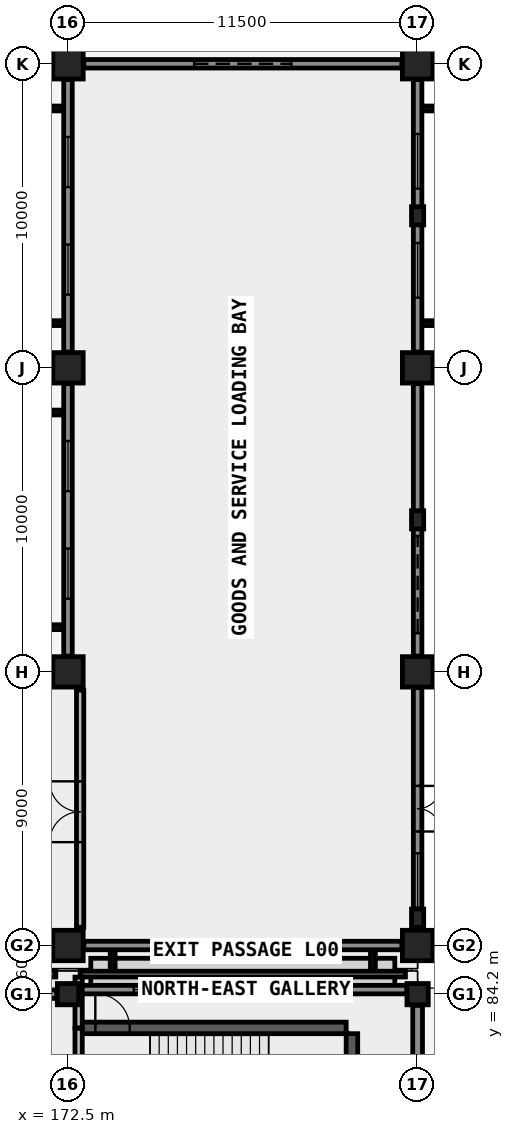
"""IFC4 building model, lengths in metres.
Left out: names, types, materials, properties, quantities, classifications, styles, units other than length and angle.
Written with IfcOpenShell. Run it as: python <this file> out.ifc"""

import sys

from ifc_helpers import new_model, si_unit, direction, frame, frame_2d, origin, origin_2d, place, context, subcontext, project, spatial, rectangle, extrude, element, fill, save


model = new_model("IFC4")
c1 = context("Model", 3, precision=1e-05, world=origin(), true_north=direction((0.0, 1.0)))
c2 = subcontext(c1, "Body", "Model", "MODEL_VIEW")
j1 = project(units=[si_unit("LENGTHUNIT", "METRE"), si_unit("PLANEANGLEUNIT", "RADIAN")], contexts=[c1])
p1 = place(None, origin())
s1 = spatial("IfcSite", under=j1, at=p1, CompositionType="ELEMENT")
p2 = place(p1, origin())
s2 = spatial("IfcBuilding", under=s1, at=p2, CompositionType="ELEMENT")
p3 = place(p2, origin())
s3 = spatial("IfcBuildingStorey", under=s2, at=p3, CompositionType="ELEMENT", Elevation=0.0)
p4 = place(p3, frame((172.5, 84.2, 0.0), z_axis=(0.0, 0.0, 1.0), x_axis=(1.0, 0.0, 0.0)))
e1 = element("IfcColumn", 1, at=p4, inside=s3, PredefinedType="COLUMN", context=c2, shape_type="SweptSolid", body=[
    extrude(rectangle(XDim=0.7, YDim=0.7, at=origin_2d()), origin(), (0.0, 0.0, 1.0), 4.2),
])
for number, where, z_axis, x_axis in (
    (2, (172.5, 85.8, 0.0), (0.0, 0.0, 1.0), (1.0, 0.0, 0.0)),
    (3, (172.5, 94.8, 0.0), (0.0, 0.0, 1.0), (1.0, 0.0, 0.0)),
    (4, (172.5, 104.8, 0.0), (0.0, 0.0, 1.0), (1.0, 0.0, 0.0)),
    (5, (172.5, 114.8, 0.0), (0.0, 0.0, 1.0), (1.0, 0.0, 0.0)),
):
    element("IfcColumn", number, at=place(p3, frame(where, z_axis=z_axis, x_axis=x_axis)), inside=s3, PredefinedType="COLUMN", context=c2, shape_type="SweptSolid", body=[
        extrude(rectangle(XDim=1.0, YDim=1.0, at=origin_2d()), origin(), (0.0, 0.0, 1.0), 4.2),
    ])
p5 = place(p3, frame((184.0, 84.2, 0.0), z_axis=(0.0, 0.0, 1.0), x_axis=(1.0, 0.0, 0.0)))
e6 = element("IfcColumn", 6, at=p5, inside=s3, PredefinedType="COLUMN", context=c2, shape_type="SweptSolid", body=[
    extrude(rectangle(XDim=0.7, YDim=0.7, at=origin_2d()), origin(), (0.0, 0.0, 1.0), 4.2),
])
for number, where, z_axis, x_axis in (
    (7, (184.0, 85.8, 0.0), (0.0, 0.0, 1.0), (1.0, 0.0, 0.0)),
    (8, (184.0, 94.8, 0.0), (0.0, 0.0, 1.0), (1.0, 0.0, 0.0)),
    (9, (184.0, 104.8, 0.0), (0.0, 0.0, 1.0), (1.0, 0.0, 0.0)),
    (10, (184.0, 114.8, 0.0), (0.0, 0.0, 1.0), (1.0, 0.0, 0.0)),
):
    element("IfcColumn", number, at=place(p3, frame(where, z_axis=z_axis, x_axis=x_axis)), inside=s3, PredefinedType="COLUMN", context=c2, shape_type="SweptSolid", body=[
        extrude(rectangle(XDim=1.0, YDim=1.0, at=origin_2d()), origin(), (0.0, 0.0, 1.0), 4.2),
    ])
for number, where, z_axis, x_axis in (
    (11, (184.0, 86.7, 0.0), (0.0, 0.0, 1.0), (1.0, 0.0, 0.0)),
    (12, (184.0, 99.8, 0.0), (0.0, 0.0, 1.0), (1.0, 0.0, 0.0)),
    (13, (184.0, 109.8, 0.0), (0.0, 0.0, 1.0), (1.0, 0.0, 0.0)),
):
    element("IfcColumn", number, at=place(p3, frame(where, z_axis=z_axis, x_axis=x_axis)), inside=s3, PredefinedType="PILASTER", context=c2, shape_type="SweptSolid", body=[
        extrude(rectangle(XDim=0.4, YDim=0.6, at=origin_2d()), origin(), (0.0, 0.0, 1.0), 4.2),
    ])
p6 = place(p3, frame((172.85, 83.09, 0.0), z_axis=(0.0, 0.0, 1.0), x_axis=(1.0, 0.0, 0.0)))
e14 = element("IfcWall", 14, at=p6, inside=s3, PredefinedType="SHEAR", context=c2, shape_type="SweptSolid", body=[
    extrude(rectangle(XDim=8.8, YDim=0.38, at=frame_2d((4.4, 0.0))), origin(), (0.0, 0.0, 1.0), 4.2),
])
p7 = place(p6, frame((0.55, 0.0, 0.0)))
e15 = element("IfcOpeningElement", 15, at=p7, cuts=e14, PredefinedType="OPENING", context=c2, shape_type="SweptSolid", body=[
    extrude(rectangle(XDim=1.13, YDim=2.15, at=frame_2d((0.565, 1.075))), frame((0.0, 0.2, 0.0), z_axis=(0.0, -1.0, 0.0), x_axis=(1.0, 0.0, 0.0)), (0.0, 0.0, 1.0), 0.4),
])
p8 = place(p3, frame((181.84, 79.1, 0.0), z_axis=(0.0, 0.0, 1.0), x_axis=(0.0, 1.0, 0.0)))
e16 = element("IfcWall", 16, at=p8, inside=s3, PredefinedType="SHEAR", context=c2, shape_type="SweptSolid", body=[
    extrude(rectangle(XDim=3.8, YDim=0.38, at=frame_2d((1.9, 0.0))), origin(), (0.0, 0.0, 1.0), 4.2),
])
p9 = place(p3, frame((184.0, 78.395, 0.0), z_axis=(0.0, 0.0, 1.0), x_axis=(0.0, 1.0, 0.0)))
e17 = element("IfcWall", 17, at=p9, inside=s3, PredefinedType="SOLIDWALL", context=c2, shape_type="SweptSolid", body=[
    extrude(rectangle(XDim=5.435, YDim=0.32, at=frame_2d((2.718, 0.0))), origin(), (0.0, 0.0, 1.0), 3.2),
])
p10 = place(p9, frame((1.768, 0.0, 0.0)))
e18 = element("IfcOpeningElement", 18, at=p10, cuts=e17, PredefinedType="OPENING", context=c2, shape_type="SweptSolid", body=[
    extrude(rectangle(XDim=1.9, YDim=2.2, at=frame_2d((0.95, 1.1))), frame((0.0, 0.17, 0.0), z_axis=(0.0, -1.0, 0.0), x_axis=(1.0, 0.0, 0.0)), (0.0, 0.0, 1.0), 0.34),
])
for number, where, z_axis, x_axis in (
    (19, (161.4, 84.86, 0.0), (0.0, 0.0, 1.0), (1.0, 0.0, 0.0)),
    (20, (172.9, 84.86, 0.0), (0.0, 0.0, 1.0), (1.0, 0.0, 0.0)),
):
    element("IfcWall", number, at=place(p3, frame(where, z_axis=z_axis, x_axis=x_axis)), inside=s3, PredefinedType="PARAPET", context=c2, shape_type="SweptSolid", body=[
        extrude(rectangle(XDim=10.7, YDim=0.19, at=frame_2d((5.35, 0.0))), origin(), (0.0, 0.0, 1.0), 1.15),
    ])
p11 = place(p3, frame((161.37, 84.2, 0.0), z_axis=(0.0, 0.0, 1.0), x_axis=(1.0, 0.0, 0.0)))
e21 = element("IfcWall", 21, at=p11, inside=s3, PredefinedType="SOLIDWALL", context=c2, shape_type="SweptSolid", body=[
    extrude(rectangle(XDim=10.76, YDim=0.28, at=frame_2d((5.38, 0.0))), origin(), (0.0, 0.0, 1.0), 3.0),
])
p12 = place(p11, frame((2.173, 0.0, 0.85)))
e22 = element("IfcOpeningElement", 22, at=p12, cuts=e21, PredefinedType="OPENING", context=c2, shape_type="SweptSolid", body=[
    extrude(rectangle(XDim=2.12, YDim=2.08, at=frame_2d((1.06, 1.04))), frame((0.0, 0.15, 0.0), z_axis=(0.0, -1.0, 0.0), x_axis=(1.0, 0.0, 0.0)), (0.0, 0.0, 1.0), 0.3),
])
p13 = place(p11, frame((6.467, 0.0, 0.85)))
e23 = element("IfcOpeningElement", 23, at=p13, cuts=e21, PredefinedType="OPENING", context=c2, shape_type="SweptSolid", body=[
    extrude(rectangle(XDim=2.12, YDim=2.08, at=frame_2d((1.06, 1.04))), frame((0.0, 0.15, 0.0), z_axis=(0.0, -1.0, 0.0), x_axis=(1.0, 0.0, 0.0)), (0.0, 0.0, 1.0), 0.3),
])
p14 = place(p3, frame((172.85, 84.35, 0.0), z_axis=(0.0, 0.0, 1.0), x_axis=(1.0, 0.0, 0.0)))
e24 = element("IfcWall", 24, at=p14, inside=s3, PredefinedType="SOLIDWALL", context=c2, shape_type="SweptSolid", body=[
    extrude(rectangle(XDim=10.8, YDim=0.28, at=frame_2d((5.4, 0.0))), origin(), (0.0, 0.0, 1.0), 3.0),
])
p15 = place(p14, frame((1.813, 0.0, 0.82)))
e25 = element("IfcOpeningElement", 25, at=p15, cuts=e24, PredefinedType="OPENING", context=c2, shape_type="SweptSolid", body=[
    extrude(rectangle(XDim=2.68, YDim=2.12, at=frame_2d((1.34, 1.06))), frame((0.0, 0.15, 0.0), z_axis=(0.0, -1.0, 0.0), x_axis=(1.0, 0.0, 0.0)), (0.0, 0.0, 1.0), 0.3),
])
p16 = place(p14, frame((6.307, 0.0, 0.82)))
e26 = element("IfcOpeningElement", 26, at=p16, cuts=e24, PredefinedType="OPENING", context=c2, shape_type="SweptSolid", body=[
    extrude(rectangle(XDim=2.68, YDim=2.12, at=frame_2d((1.34, 1.06))), frame((0.0, 0.15, 0.0), z_axis=(0.0, -1.0, 0.0), x_axis=(1.0, 0.0, 0.0)), (0.0, 0.0, 1.0), 0.3),
])
p17 = place(p3, frame((173.02, 85.8, 0.0), z_axis=(0.0, 0.0, 1.0), x_axis=(1.0, 0.0, 0.0)))
e27 = element("IfcWall", 27, at=p17, inside=s3, PredefinedType="SOLIDWALL", context=c2, shape_type="SweptSolid", body=[
    extrude(rectangle(XDim=10.46, YDim=0.28, at=frame_2d((5.23, 0.0))), origin(), (0.0, 0.0, 1.0), 3.15),
])
p18 = place(p17, frame((2.92, 0.0, 1.25)))
e28 = element("IfcOpeningElement", 28, at=p18, cuts=e27, PredefinedType="OPENING", context=c2, shape_type="SweptSolid", body=[
    extrude(rectangle(XDim=0.85, YDim=0.95, at=frame_2d((0.425, 0.475))), frame((0.0, 0.15, 0.0), z_axis=(0.0, -1.0, 0.0), x_axis=(1.0, 0.0, 0.0)), (0.0, 0.0, 1.0), 0.3),
])
p19 = place(p17, frame((6.69, 0.0, 1.25)))
e29 = element("IfcOpeningElement", 29, at=p19, cuts=e27, PredefinedType="OPENING", context=c2, shape_type="SweptSolid", body=[
    extrude(rectangle(XDim=0.85, YDim=0.95, at=frame_2d((0.425, 0.475))), frame((0.0, 0.15, 0.0), z_axis=(0.0, -1.0, 0.0), x_axis=(1.0, 0.0, 0.0)), (0.0, 0.0, 1.0), 0.3),
])
p20 = place(p3, frame((184.0, 86.32, 0.0), z_axis=(0.0, 0.0, 1.0), x_axis=(0.0, 1.0, 0.0)))
e30 = element("IfcWall", 30, at=p20, inside=s3, PredefinedType="SOLIDWALL", context=c2, shape_type="SweptSolid", body=[
    extrude(rectangle(XDim=7.96, YDim=0.28, at=frame_2d((3.98, 0.0))), origin(), (0.0, 0.0, 1.0), 3.25),
])
p21 = place(p20, frame((3.23, 0.0, 0.0)))
e31 = element("IfcOpeningElement", 31, at=p21, cuts=e30, PredefinedType="OPENING", context=c2, shape_type="SweptSolid", body=[
    extrude(rectangle(XDim=1.5, YDim=2.3, at=frame_2d((0.75, 1.15))), frame((0.0, 0.15, 0.0), z_axis=(0.0, -1.0, 0.0), x_axis=(1.0, 0.0, 0.0)), (0.0, 0.0, 1.0), 0.3),
])
p22 = place(p20, frame((0.715, 0.0, 0.78)))
e32 = element("IfcOpeningElement", 32, at=p22, cuts=e30, PredefinedType="OPENING", context=c2, shape_type="SweptSolid", body=[
    extrude(rectangle(XDim=1.8, YDim=1.3, at=frame_2d((0.9, 0.65))), frame((0.0, 0.15, 0.0), z_axis=(0.0, -1.0, 0.0), x_axis=(1.0, 0.0, 0.0)), (0.0, 0.0, 1.0), 0.3),
])
p23 = place(p3, frame((184.0, 95.32, 0.0), z_axis=(0.0, 0.0, 1.0), x_axis=(0.0, 1.0, 0.0)))
e33 = element("IfcWall", 33, at=p23, inside=s3, PredefinedType="SOLIDWALL", context=c2, shape_type="SweptSolid", body=[
    extrude(rectangle(XDim=8.96, YDim=0.28, at=frame_2d((4.48, 0.0))), origin(), (0.0, 0.0, 1.0), 3.25),
])
p24 = place(p23, frame((0.75, 0.0, 0.0)))
e34 = element("IfcOpeningElement", 34, at=p24, cuts=e33, PredefinedType="OPENING", context=c2, shape_type="SweptSolid", body=[
    extrude(rectangle(XDim=3.2, YDim=3.05, at=frame_2d((1.6, 1.525))), frame((0.0, 0.15, 0.0), z_axis=(0.0, -1.0, 0.0), x_axis=(1.0, 0.0, 0.0)), (0.0, 0.0, 1.0), 0.3),
])
p25 = place(p3, frame((184.0, 105.32, 0.0), z_axis=(0.0, 0.0, 1.0), x_axis=(0.0, 1.0, 0.0)))
e35 = element("IfcWall", 35, at=p25, inside=s3, PredefinedType="SOLIDWALL", context=c2, shape_type="SweptSolid", body=[
    extrude(rectangle(XDim=8.96, YDim=0.28, at=frame_2d((4.48, 0.0))), origin(), (0.0, 0.0, 1.0), 3.25),
])
p26 = place(p25, frame((1.787, 0.0, 1.25)))
e36 = element("IfcOpeningElement", 36, at=p26, cuts=e35, PredefinedType="OPENING", context=c2, shape_type="SweptSolid", body=[
    extrude(rectangle(XDim=1.8, YDim=1.3, at=frame_2d((0.9, 0.65))), frame((0.0, 0.15, 0.0), z_axis=(0.0, -1.0, 0.0), x_axis=(1.0, 0.0, 0.0)), (0.0, 0.0, 1.0), 0.3),
])
p27 = place(p25, frame((5.373, 0.0, 1.25)))
e37 = element("IfcOpeningElement", 37, at=p27, cuts=e35, PredefinedType="OPENING", context=c2, shape_type="SweptSolid", body=[
    extrude(rectangle(XDim=1.8, YDim=1.3, at=frame_2d((0.9, 0.65))), frame((0.0, 0.15, 0.0), z_axis=(0.0, -1.0, 0.0), x_axis=(1.0, 0.0, 0.0)), (0.0, 0.0, 1.0), 0.3),
])
p28 = place(p3, frame((173.02, 114.8, 0.0), z_axis=(0.0, 0.0, 1.0), x_axis=(1.0, 0.0, 0.0)))
e38 = element("IfcWall", 38, at=p28, inside=s3, PredefinedType="SOLIDWALL", context=c2, shape_type="SweptSolid", body=[
    extrude(rectangle(XDim=10.46, YDim=0.28, at=frame_2d((5.23, 0.0))), origin(), (0.0, 0.0, 1.0), 3.15),
])
p29 = place(p28, frame((3.63, 0.0, 0.0)))
e39 = element("IfcOpeningElement", 39, at=p29, cuts=e38, PredefinedType="OPENING", context=c2, shape_type="SweptSolid", body=[
    extrude(rectangle(XDim=3.2, YDim=3.05, at=frame_2d((1.6, 1.525))), frame((0.0, 0.15, 0.0), z_axis=(0.0, -1.0, 0.0), x_axis=(1.0, 0.0, 0.0)), (0.0, 0.0, 1.0), 0.3),
])
p30 = place(p3, frame((172.5, 95.32, 0.0), z_axis=(0.0, 0.0, 1.0), x_axis=(0.0, 1.0, 0.0)))
e40 = element("IfcWall", 40, at=p30, inside=s3, PredefinedType="SOLIDWALL", context=c2, shape_type="SweptSolid", body=[
    extrude(rectangle(XDim=8.96, YDim=0.28, at=frame_2d((4.48, 0.0))), origin(), (0.0, 0.0, 1.0), 3.15),
])
p31 = place(p30, frame((1.887, 0.0, 0.85)))
e41 = element("IfcOpeningElement", 41, at=p31, cuts=e40, PredefinedType="OPENING", context=c2, shape_type="SweptSolid", body=[
    extrude(rectangle(XDim=1.65, YDim=1.9, at=frame_2d((0.825, 0.95))), frame((0.0, 0.15, 0.0), z_axis=(0.0, -1.0, 0.0), x_axis=(1.0, 0.0, 0.0)), (0.0, 0.0, 1.0), 0.3),
])
p32 = place(p30, frame((5.423, 0.0, 0.85)))
e42 = element("IfcOpeningElement", 42, at=p32, cuts=e40, PredefinedType="OPENING", context=c2, shape_type="SweptSolid", body=[
    extrude(rectangle(XDim=1.65, YDim=1.9, at=frame_2d((0.825, 0.95))), frame((0.0, 0.15, 0.0), z_axis=(0.0, -1.0, 0.0), x_axis=(1.0, 0.0, 0.0)), (0.0, 0.0, 1.0), 0.3),
])
p33 = place(p3, frame((172.5, 105.32, 0.0), z_axis=(0.0, 0.0, 1.0), x_axis=(0.0, 1.0, 0.0)))
e43 = element("IfcWall", 43, at=p33, inside=s3, PredefinedType="SOLIDWALL", context=c2, shape_type="SweptSolid", body=[
    extrude(rectangle(XDim=8.96, YDim=0.28, at=frame_2d((4.48, 0.0))), origin(), (0.0, 0.0, 1.0), 3.15),
])
p34 = place(p33, frame((1.887, 0.0, 0.85)))
e44 = element("IfcOpeningElement", 44, at=p34, cuts=e43, PredefinedType="OPENING", context=c2, shape_type="SweptSolid", body=[
    extrude(rectangle(XDim=1.65, YDim=1.9, at=frame_2d((0.825, 0.95))), frame((0.0, 0.15, 0.0), z_axis=(0.0, -1.0, 0.0), x_axis=(1.0, 0.0, 0.0)), (0.0, 0.0, 1.0), 0.3),
])
p35 = place(p33, frame((5.423, 0.0, 0.85)))
e45 = element("IfcOpeningElement", 45, at=p35, cuts=e43, PredefinedType="OPENING", context=c2, shape_type="SweptSolid", body=[
    extrude(rectangle(XDim=1.65, YDim=1.9, at=frame_2d((0.825, 0.95))), frame((0.0, 0.15, 0.0), z_axis=(0.0, -1.0, 0.0), x_axis=(1.0, 0.0, 0.0)), (0.0, 0.0, 1.0), 0.3),
])
p36 = place(p3, frame((172.85, 78.92, 0.0), z_axis=(0.0, 0.0, 1.0), x_axis=(0.0, 1.0, 0.0)))
e46 = element("IfcWall", 46, at=p36, inside=s3, PredefinedType="SOLIDWALL", context=c2, shape_type="SweptSolid", body=[
    extrude(rectangle(XDim=4.16, YDim=0.24, at=frame_2d((2.08, 0.0))), origin(), (0.0, 0.0, 1.0), 3.88),
])
p37 = place(p36, frame((1.3, 0.0, 0.0)))
e47 = element("IfcOpeningElement", 47, at=p37, cuts=e46, PredefinedType="OPENING", context=c2, shape_type="SweptSolid", body=[
    extrude(rectangle(XDim=1.13, YDim=2.15, at=frame_2d((0.565, 1.075))), frame((0.0, 0.13, 0.0), z_axis=(0.0, -1.0, 0.0), x_axis=(1.0, 0.0, 0.0)), (0.0, 0.0, 1.0), 0.26),
])
p38 = place(p3, frame((172.9, 86.4, 0.0), z_axis=(0.0, 0.0, 1.0), x_axis=(0.0, 1.0, 0.0)))
e48 = element("IfcWall", 48, at=p38, inside=s3, PredefinedType="SOLIDWALL", context=c2, shape_type="SweptSolid", body=[
    extrude(rectangle(XDim=7.8, YDim=0.24, at=frame_2d((3.9, 0.0))), origin(), (0.0, 0.0, 1.0), 3.88),
])
p39 = place(p38, frame((2.8, 0.0, 0.0)))
e49 = element("IfcOpeningElement", 49, at=p39, cuts=e48, PredefinedType="OPENING", context=c2, shape_type="SweptSolid", body=[
    extrude(rectangle(XDim=2.0, YDim=2.3, at=frame_2d((1.0, 1.15))), frame((0.0, 0.13, 0.0), z_axis=(0.0, -1.0, 0.0), x_axis=(1.0, 0.0, 0.0)), (0.0, 0.0, 1.0), 0.26),
])
p40 = place(p3, frame((172.85, 83.09, 0.0), z_axis=(0.0, 0.0, 1.0), x_axis=(0.0, 1.0, 0.0)))
e50 = element("IfcWall", 50, at=p40, inside=s3, PredefinedType="SOLIDWALL", context=c2, shape_type="SweptSolid", body=[
    extrude(rectangle(XDim=1.67, YDim=0.24, at=frame_2d((0.835, 0.0))), origin(), (0.0, 0.0, 1.0), 3.88),
])
p41 = place(p15, origin())
e51 = element("IfcWindow", 51, at=p41, inside=s3, PartitioningType="SINGLE_PANEL", PredefinedType="WINDOW", context=c2, shape_type="SweptSolid", body=[
    extrude(rectangle(XDim=2.68, YDim=2.12, at=frame_2d((1.34, 1.06))), frame((0.0, 0.03, 0.0), z_axis=(0.0, -1.0, 0.0), x_axis=(1.0, 0.0, 0.0)), (0.0, 0.0, 1.0), 0.06),
])
fill(e25, e51)
p42 = place(p16, origin())
e52 = element("IfcWindow", 52, at=p42, inside=s3, PartitioningType="SINGLE_PANEL", PredefinedType="WINDOW", context=c2, shape_type="SweptSolid", body=[
    extrude(rectangle(XDim=2.68, YDim=2.12, at=frame_2d((1.34, 1.06))), frame((0.0, 0.03, 0.0), z_axis=(0.0, -1.0, 0.0), x_axis=(1.0, 0.0, 0.0)), (0.0, 0.0, 1.0), 0.06),
])
fill(e26, e52)
p43 = place(p18, origin())
e53 = element("IfcWindow", 53, at=p43, inside=s3, PartitioningType="SINGLE_PANEL", PredefinedType="WINDOW", context=c2, shape_type="SweptSolid", body=[
    extrude(rectangle(XDim=0.85, YDim=0.95, at=frame_2d((0.425, 0.475))), frame((0.0, 0.03, 0.0), z_axis=(0.0, -1.0, 0.0), x_axis=(1.0, 0.0, 0.0)), (0.0, 0.0, 1.0), 0.06),
])
fill(e28, e53)
p44 = place(p19, origin())
e54 = element("IfcWindow", 54, at=p44, inside=s3, PartitioningType="SINGLE_PANEL", PredefinedType="WINDOW", context=c2, shape_type="SweptSolid", body=[
    extrude(rectangle(XDim=0.85, YDim=0.95, at=frame_2d((0.425, 0.475))), frame((0.0, 0.03, 0.0), z_axis=(0.0, -1.0, 0.0), x_axis=(1.0, 0.0, 0.0)), (0.0, 0.0, 1.0), 0.06),
])
fill(e29, e54)
p45 = place(p21, frame((0.75, 0.0, 0.0), z_axis=(0.0, 0.0, 1.0), x_axis=(-1.0, 0.0, 0.0)))
e55 = element("IfcDoor", 55, at=p45, inside=s3, OperationType="DOUBLE_DOOR_SINGLE_SWING", PredefinedType="DOOR", context=c2, shape_type="SweptSolid", body=[
    extrude(rectangle(XDim=1.5, YDim=2.3, at=frame_2d((0.0, 1.15))), frame((0.0, 0.025, 0.0), z_axis=(0.0, -1.0, 0.0), x_axis=(1.0, 0.0, 0.0)), (0.0, 0.0, 1.0), 0.05),
])
fill(e31, e55)
p46 = place(p22, origin())
e56 = element("IfcWindow", 56, at=p46, inside=s3, PartitioningType="SINGLE_PANEL", PredefinedType="WINDOW", context=c2, shape_type="SweptSolid", body=[
    extrude(rectangle(XDim=1.8, YDim=1.3, at=frame_2d((0.9, 0.65))), frame((0.0, 0.03, 0.0), z_axis=(0.0, -1.0, 0.0), x_axis=(1.0, 0.0, 0.0)), (0.0, 0.0, 1.0), 0.06),
])
fill(e32, e56)
p47 = place(p24, origin())
e57 = element("IfcDoor", 57, at=p47, inside=s3, OperationType="ROLLINGUP", PredefinedType="GATE", context=c2, shape_type="SweptSolid", body=[
    extrude(rectangle(XDim=3.2, YDim=3.05, at=frame_2d((1.6, 1.525))), frame((0.0, 0.025, 0.0), z_axis=(0.0, -1.0, 0.0), x_axis=(1.0, 0.0, 0.0)), (0.0, 0.0, 1.0), 0.05),
])
fill(e34, e57)
p48 = place(p26, origin())
e58 = element("IfcWindow", 58, at=p48, inside=s3, PartitioningType="SINGLE_PANEL", PredefinedType="WINDOW", context=c2, shape_type="SweptSolid", body=[
    extrude(rectangle(XDim=1.8, YDim=1.3, at=frame_2d((0.9, 0.65))), frame((0.0, 0.03, 0.0), z_axis=(0.0, -1.0, 0.0), x_axis=(1.0, 0.0, 0.0)), (0.0, 0.0, 1.0), 0.06),
])
fill(e36, e58)
p49 = place(p27, origin())
e59 = element("IfcWindow", 59, at=p49, inside=s3, PartitioningType="SINGLE_PANEL", PredefinedType="WINDOW", context=c2, shape_type="SweptSolid", body=[
    extrude(rectangle(XDim=1.8, YDim=1.3, at=frame_2d((0.9, 0.65))), frame((0.0, 0.03, 0.0), z_axis=(0.0, -1.0, 0.0), x_axis=(1.0, 0.0, 0.0)), (0.0, 0.0, 1.0), 0.06),
])
fill(e37, e59)
p50 = place(p29, origin())
e60 = element("IfcDoor", 60, at=p50, inside=s3, OperationType="ROLLINGUP", PredefinedType="GATE", context=c2, shape_type="SweptSolid", body=[
    extrude(rectangle(XDim=3.2, YDim=3.05, at=frame_2d((1.6, 1.525))), frame((0.0, 0.025, 0.0), z_axis=(0.0, -1.0, 0.0), x_axis=(1.0, 0.0, 0.0)), (0.0, 0.0, 1.0), 0.05),
])
fill(e39, e60)
p51 = place(p31, origin())
e61 = element("IfcWindow", 61, at=p51, inside=s3, PartitioningType="SINGLE_PANEL", PredefinedType="WINDOW", context=c2, shape_type="SweptSolid", body=[
    extrude(rectangle(XDim=1.65, YDim=1.9, at=frame_2d((0.825, 0.95))), frame((0.0, 0.03, 0.0), z_axis=(0.0, -1.0, 0.0), x_axis=(1.0, 0.0, 0.0)), (0.0, 0.0, 1.0), 0.06),
])
fill(e41, e61)
p52 = place(p32, origin())
e62 = element("IfcWindow", 62, at=p52, inside=s3, PartitioningType="SINGLE_PANEL", PredefinedType="WINDOW", context=c2, shape_type="SweptSolid", body=[
    extrude(rectangle(XDim=1.65, YDim=1.9, at=frame_2d((0.825, 0.95))), frame((0.0, 0.03, 0.0), z_axis=(0.0, -1.0, 0.0), x_axis=(1.0, 0.0, 0.0)), (0.0, 0.0, 1.0), 0.06),
])
fill(e42, e62)
p53 = place(p34, origin())
e63 = element("IfcWindow", 63, at=p53, inside=s3, PartitioningType="SINGLE_PANEL", PredefinedType="WINDOW", context=c2, shape_type="SweptSolid", body=[
    extrude(rectangle(XDim=1.65, YDim=1.9, at=frame_2d((0.825, 0.95))), frame((0.0, 0.03, 0.0), z_axis=(0.0, -1.0, 0.0), x_axis=(1.0, 0.0, 0.0)), (0.0, 0.0, 1.0), 0.06),
])
fill(e44, e63)
p54 = place(p35, origin())
e64 = element("IfcWindow", 64, at=p54, inside=s3, PartitioningType="SINGLE_PANEL", PredefinedType="WINDOW", context=c2, shape_type="SweptSolid", body=[
    extrude(rectangle(XDim=1.65, YDim=1.9, at=frame_2d((0.825, 0.95))), frame((0.0, 0.03, 0.0), z_axis=(0.0, -1.0, 0.0), x_axis=(1.0, 0.0, 0.0)), (0.0, 0.0, 1.0), 0.06),
])
fill(e45, e64)
p55 = place(p7, origin())
e65 = element("IfcDoor", 65, at=p55, inside=s3, OperationType="SINGLE_SWING_LEFT", PredefinedType="DOOR", context=c2, shape_type="SweptSolid", body=[
    extrude(rectangle(XDim=1.13, YDim=2.15, at=frame_2d((0.565, 1.075))), frame((0.0, 0.025, 0.0), z_axis=(0.0, -1.0, 0.0), x_axis=(1.0, 0.0, 0.0)), (0.0, 0.0, 1.0), 0.05),
])
fill(e15, e65)
p56 = place(p39, origin())
e66 = element("IfcDoor", 66, at=p56, inside=s3, OperationType="DOUBLE_DOOR_SINGLE_SWING", PredefinedType="DOOR", context=c2, shape_type="SweptSolid", body=[
    extrude(rectangle(XDim=2.0, YDim=2.3, at=frame_2d((1.0, 1.15))), frame((0.0, 0.025, 0.0), z_axis=(0.0, -1.0, 0.0), x_axis=(1.0, 0.0, 0.0)), (0.0, 0.0, 1.0), 0.05),
])
fill(e49, e66)
save(model, sys.argv[1])
